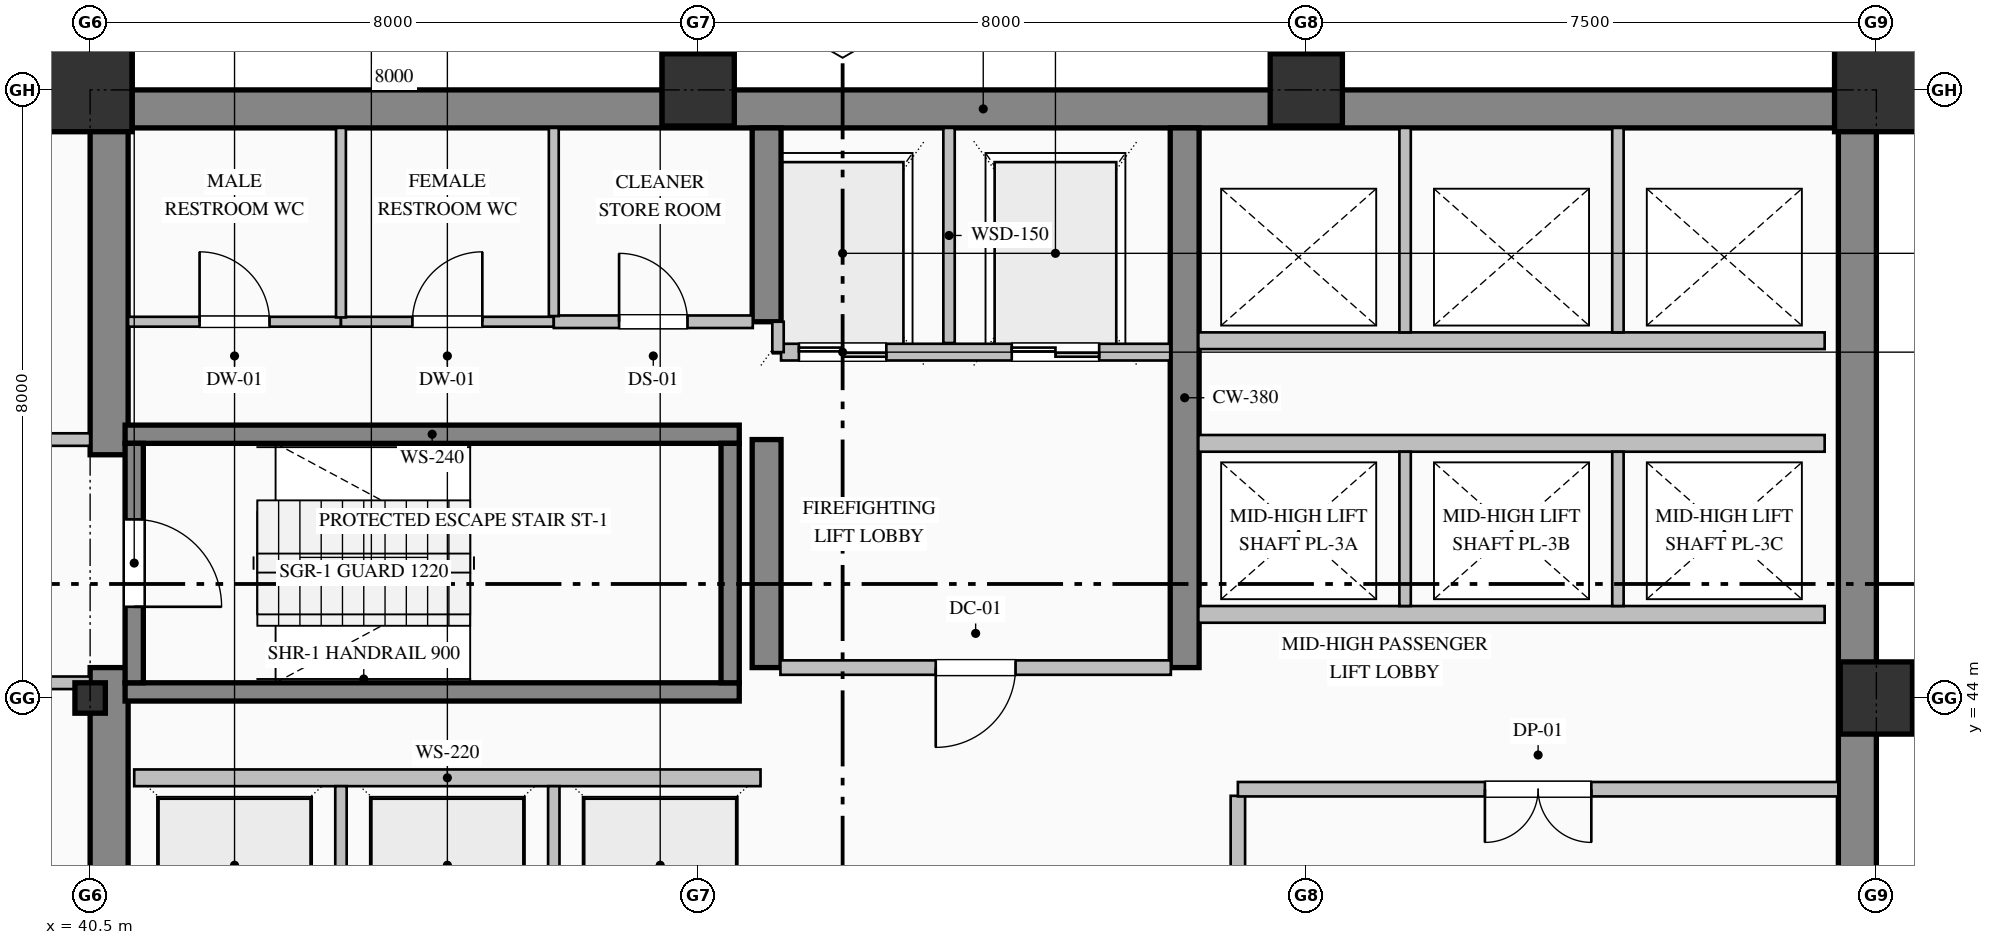
"""IFC4 building model, lengths in metres.
Left out: names, types, materials, properties, quantities, classifications, styles, units other than length and angle.
Written with IfcOpenShell. Run it as: python <this file> out.ifc"""

import sys

from ifc_helpers import new_model, si_unit, direction, frame, frame_2d, origin, origin_2d, place, context, subcontext, project, spatial, rectangle, hollow_rectangle, i_section, extrude, element, fill, save


model = new_model("IFC4")
c1 = context("Model", 3, precision=1e-05, world=origin(), true_north=direction((0.0, 1.0)))
c2 = subcontext(c1, "Body", "Model", "MODEL_VIEW")
j1 = project(units=[si_unit("LENGTHUNIT", "METRE"), si_unit("PLANEANGLEUNIT", "RADIAN")], contexts=[c1])
p1 = place(None, origin())
s1 = spatial("IfcSite", under=j1, at=p1, CompositionType="ELEMENT")
p2 = place(p1, origin())
s2 = spatial("IfcBuilding", under=s1, at=p2, CompositionType="ELEMENT")
p3 = place(p2, frame((0.0, 0.0, 171.0)))
s3 = spatial("IfcBuildingStorey", under=s2, at=p3, CompositionType="ELEMENT", Elevation=171.0)
p4 = place(p3, frame((40.5, 51.75, 0.0), z_axis=(0.0, 0.0, 1.0), x_axis=(1.0, 0.0, 0.0)))
e1 = element("IfcWall", 1, at=p4, inside=s3, PredefinedType="SHEAR", context=c2, shape_type="SweptSolid", body=[
    extrude(rectangle(XDim=23.5, YDim=0.5, at=frame_2d((11.75, 0.0))), origin(), (0.0, 0.0, 1.0), 3.765),
])
p5 = place(p3, frame((63.75, 36.32, 0.0), z_axis=(0.0, 0.0, 1.0), x_axis=(0.0, 1.0, 0.0)))
e2 = element("IfcWall", 2, at=p5, inside=s3, PredefinedType="SHEAR", context=c2, shape_type="SweptSolid", body=[
    extrude(rectangle(XDim=15.18, YDim=0.5, at=frame_2d((7.59, 0.0))), origin(), (0.0, 0.0, 1.0), 3.765),
])
p6 = place(p3, frame((40.75, 36.5, 0.0), z_axis=(0.0, 0.0, 1.0), x_axis=(0.0, 1.0, 0.0)))
e3 = element("IfcWall", 3, at=p6, inside=s3, PredefinedType="SHEAR", context=c2, shape_type="SweptSolid", body=[
    extrude(rectangle(XDim=7.9, YDim=0.5, at=frame_2d((3.95, 0.0))), origin(), (0.0, 0.0, 1.0), 3.765),
])
p7 = place(p3, frame((40.75, 47.2, 0.0), z_axis=(0.0, 0.0, 1.0), x_axis=(0.0, 1.0, 0.0)))
e4 = element("IfcWall", 4, at=p7, inside=s3, PredefinedType="SHEAR", context=c2, shape_type="SweptSolid", body=[
    extrude(rectangle(XDim=4.3, YDim=0.5, at=frame_2d((2.15, 0.0))), origin(), (0.0, 0.0, 1.0), 3.765),
])
p8 = place(p3, frame((49.4, 44.4, 0.0), z_axis=(0.0, 0.0, 1.0), x_axis=(0.0, 1.0, 0.0)))
e5 = element("IfcWall", 5, at=p8, inside=s3, PredefinedType="SHEAR", context=c2, shape_type="SweptSolid", body=[
    extrude(rectangle(XDim=3.0, YDim=0.38, at=frame_2d((1.5, 0.0))), origin(), (0.0, 0.0, 1.0), 3.765),
])
p9 = place(p3, frame((49.4, 48.95, 0.0), z_axis=(0.0, 0.0, 1.0), x_axis=(0.0, 1.0, 0.0)))
e6 = element("IfcWall", 6, at=p9, inside=s3, PredefinedType="SHEAR", context=c2, shape_type="SweptSolid", body=[
    extrude(rectangle(XDim=2.55, YDim=0.38, at=frame_2d((1.275, 0.0))), origin(), (0.0, 0.0, 1.0), 3.765),
])
p10 = place(p3, frame((54.9, 44.4, 0.0), z_axis=(0.0, 0.0, 1.0), x_axis=(0.0, 1.0, 0.0)))
e7 = element("IfcWall", 7, at=p10, inside=s3, PredefinedType="SHEAR", context=c2, shape_type="SweptSolid", body=[
    extrude(rectangle(XDim=7.1, YDim=0.38, at=frame_2d((3.55, 0.0))), origin(), (0.0, 0.0, 1.0), 3.765),
])
p11 = place(p3, frame((40.5, 44.0, 0.0), z_axis=(0.0, 0.0, 1.0), x_axis=(1.0, 0.0, 0.0)))
e8 = element("IfcColumn", 8, at=p11, inside=s3, PredefinedType="COLUMN", context=c2, shape_type="SweptSolid", body=[
    extrude(i_section(OverallWidth=0.4, OverallDepth=0.4, WebThickness=0.013, FlangeThickness=0.021, FilletRadius=0.022, at=origin_2d()), origin(), (0.0, 0.0, 1.0), 4.0),
])
p12 = place(p3, frame((40.5, 52.0, 0.0), z_axis=(0.0, 0.0, 1.0), x_axis=(1.0, 0.0, 0.0)))
e9 = element("IfcColumn", 9, at=p12, inside=s3, PredefinedType="COLUMN", context=c2, shape_type="SweptSolid", body=[
    extrude(hollow_rectangle(XDim=1.1, YDim=1.1, WallThickness=0.04, at=origin_2d()), origin(), (0.0, 0.0, 1.0), 4.0),
])
for number, where, z_axis, x_axis in (
    (10, (48.5, 52.0, 0.0), (0.0, 0.0, 1.0), (1.0, 0.0, 0.0)),
    (11, (56.5, 52.0, 0.0), (0.0, 0.0, 1.0), (1.0, 0.0, 0.0)),
    (12, (64.0, 44.0, 0.0), (0.0, 0.0, 1.0), (1.0, 0.0, 0.0)),
):
    element("IfcColumn", number, at=place(p3, frame(where, z_axis=z_axis, x_axis=x_axis)), inside=s3, PredefinedType="COLUMN", context=c2, shape_type="SweptSolid", body=[
        extrude(hollow_rectangle(XDim=0.95, YDim=0.95, WallThickness=0.036, at=origin_2d()), origin(), (0.0, 0.0, 1.0), 4.0),
    ])
p13 = place(p3, frame((64.0, 52.0, 0.0), z_axis=(0.0, 0.0, 1.0), x_axis=(1.0, 0.0, 0.0)))
e13 = element("IfcColumn", 13, at=p13, inside=s3, PredefinedType="COLUMN", context=c2, shape_type="SweptSolid", body=[
    extrude(hollow_rectangle(XDim=1.1, YDim=1.1, WallThickness=0.04, at=origin_2d()), origin(), (0.0, 0.0, 1.0), 4.0),
])
p14 = place(p3, frame((13.0, 51.82, 0.0), z_axis=(0.0, 0.0, 1.0), x_axis=(1.0, 0.0, 0.0)))
e14 = element("IfcWall", 14, at=p14, inside=s3, PredefinedType="SOLIDWALL", context=c2, shape_type="SweptSolid", body=[
    extrude(rectangle(XDim=27.52, YDim=0.36, at=frame_2d((13.76, 0.0))), origin(), (0.0, 0.0, 1.0), 3.265),
])
for number, where, z_axis, x_axis in (
    (15, (40.96, 47.47, 0.0), (0.0, 0.0, 1.0), (1.0, 0.0, 0.0)),
    (16, (49.04, 44.08, 0.0), (0.0, 0.0, 1.0), (-1.0, 0.0, 0.0)),
):
    element("IfcWall", number, at=place(p3, frame(where, z_axis=z_axis, x_axis=x_axis)), inside=s3, PredefinedType="SOLIDWALL", context=c2, shape_type="SweptSolid", body=[
        extrude(rectangle(XDim=8.08, YDim=0.24, at=frame_2d((4.04, 0.0))), origin(), (0.0, 0.0, 1.0), 4.0),
    ])
p15 = place(p3, frame((41.08, 47.35, 0.0), z_axis=(0.0, 0.0, 1.0), x_axis=(0.0, -1.0, 0.0)))
e17 = element("IfcWall", 17, at=p15, inside=s3, PredefinedType="SOLIDWALL", context=c2, shape_type="SweptSolid", body=[
    extrude(rectangle(XDim=3.15, YDim=0.24, at=frame_2d((1.575, 0.0))), origin(), (0.0, 0.0, 1.0), 4.0),
])
p16 = place(p15, frame((1.0, 0.0, 0.0)))
e18 = element("IfcOpeningElement", 18, at=p16, cuts=e17, PredefinedType="OPENING", context=c2, shape_type="SweptSolid", body=[
    extrude(rectangle(XDim=1.15, YDim=2.2, at=frame_2d((0.575, 1.1))), frame((0.0, 0.13, 0.0), z_axis=(0.0, -1.0, 0.0), x_axis=(1.0, 0.0, 0.0)), (0.0, 0.0, 1.0), 0.26),
])
p17 = place(p3, frame((48.92, 44.2, 0.0), z_axis=(0.0, 0.0, 1.0), x_axis=(0.0, 1.0, 0.0)))
e19 = element("IfcWall", 19, at=p17, inside=s3, PredefinedType="SOLIDWALL", context=c2, shape_type="SweptSolid", body=[
    extrude(rectangle(XDim=3.15, YDim=0.24, at=frame_2d((1.575, 0.0))), origin(), (0.0, 0.0, 1.0), 4.0),
])
p18 = place(p3, frame((54.71, 48.55, 0.0), z_axis=(0.0, 0.0, 1.0), x_axis=(-1.0, 0.0, 0.0)))
e20 = element("IfcWall", 20, at=p18, inside=s3, PredefinedType="PARTITIONING", context=c2, shape_type="SweptSolid", body=[
    extrude(rectangle(XDim=5.12, YDim=0.22, at=frame_2d((2.56, 0.0))), origin(), (0.0, 0.0, 1.0), 3.765),
])
p19 = place(p18, frame((3.735, 0.0, 0.0)))
e21 = element("IfcOpeningElement", 21, at=p19, cuts=e20, PredefinedType="OPENING", context=c2, shape_type="SweptSolid", body=[
    extrude(rectangle(XDim=1.15, YDim=2.2, at=frame_2d((0.575, 1.1))), frame((0.0, 0.12, 0.0), z_axis=(0.0, -1.0, 0.0), x_axis=(1.0, 0.0, 0.0)), (0.0, 0.0, 1.0), 0.24),
])
p20 = place(p18, frame((0.935, 0.0, 0.0)))
e22 = element("IfcOpeningElement", 22, at=p20, cuts=e20, PredefinedType="OPENING", context=c2, shape_type="SweptSolid", body=[
    extrude(rectangle(XDim=1.15, YDim=2.2, at=frame_2d((0.575, 1.1))), frame((0.0, 0.12, 0.0), z_axis=(0.0, -1.0, 0.0), x_axis=(1.0, 0.0, 0.0)), (0.0, 0.0, 1.0), 0.24),
])
p21 = place(p3, frame((51.8, 48.67, 0.0), z_axis=(0.0, 0.0, 1.0), x_axis=(0.0, 1.0, 0.0)))
e23 = element("IfcWall", 23, at=p21, inside=s3, PredefinedType="PARTITIONING", context=c2, shape_type="SweptSolid", body=[
    extrude(rectangle(XDim=2.83, YDim=0.15, at=frame_2d((1.415, 0.0))), origin(), (0.0, 0.0, 1.0), 3.765),
])
p22 = place(p3, frame((49.55, 48.55, 0.0), z_axis=(0.0, 0.0, 1.0), x_axis=(0.0, 1.0, 0.0)))
e24 = element("IfcWall", 24, at=p22, inside=s3, PredefinedType="PARTITIONING", context=c2, shape_type="SweptSolid", body=[
    extrude(rectangle(XDim=0.4, YDim=0.15, at=frame_2d((0.2, 0.0))), origin(), (0.0, 0.0, 1.0), 3.765),
])
p23 = place(p3, frame((41.08, 42.95, 0.0), z_axis=(0.0, 0.0, 1.0), x_axis=(1.0, 0.0, 0.0)))
e25 = element("IfcWall", 25, at=p23, inside=s3, PredefinedType="PARTITIONING", context=c2, shape_type="SweptSolid", body=[
    extrude(rectangle(XDim=8.24, YDim=0.22, at=frame_2d((4.12, 0.0))), origin(), (0.0, 0.0, 1.0), 3.765),
])
for number, where, z_axis, x_axis in (
    (26, (43.8, 40.76, 0.0), (0.0, 0.0, 1.0), (0.0, 1.0, 0.0)),
    (27, (46.6, 40.76, 0.0), (0.0, 0.0, 1.0), (0.0, 1.0, 0.0)),
):
    element("IfcWall", number, at=place(p3, frame(where, z_axis=z_axis, x_axis=x_axis)), inside=s3, PredefinedType="PARTITIONING", context=c2, shape_type="SweptSolid", body=[
        extrude(rectangle(XDim=2.08, YDim=0.15, at=frame_2d((1.04, 0.0))), origin(), (0.0, 0.0, 1.0), 3.765),
    ])
for number, where, z_axis, x_axis in (
    (28, (63.32, 45.1, 0.0), (0.0, 0.0, 1.0), (-1.0, 0.0, 0.0)),
    (29, (55.08, 47.35, 0.0), (0.0, 0.0, 1.0), (1.0, 0.0, 0.0)),
):
    element("IfcWall", number, at=place(p3, frame(where, z_axis=z_axis, x_axis=x_axis)), inside=s3, PredefinedType="PARTITIONING", context=c2, shape_type="SweptSolid", body=[
        extrude(rectangle(XDim=8.24, YDim=0.22, at=frame_2d((4.12, 0.0))), origin(), (0.0, 0.0, 1.0), 3.765),
    ])
for number, where, z_axis, x_axis in (
    (30, (57.8, 45.21, 0.0), (0.0, 0.0, 1.0), (0.0, 1.0, 0.0)),
    (31, (60.6, 45.21, 0.0), (0.0, 0.0, 1.0), (0.0, 1.0, 0.0)),
):
    element("IfcWall", number, at=place(p3, frame(where, z_axis=z_axis, x_axis=x_axis)), inside=s3, PredefinedType="PARTITIONING", context=c2, shape_type="SweptSolid", body=[
        extrude(rectangle(XDim=2.03, YDim=0.15, at=frame_2d((1.015, 0.0))), origin(), (0.0, 0.0, 1.0), 3.765),
    ])
p24 = place(p3, frame((63.32, 48.7, 0.0), z_axis=(0.0, 0.0, 1.0), x_axis=(-1.0, 0.0, 0.0)))
e32 = element("IfcWall", 32, at=p24, inside=s3, PredefinedType="PARTITIONING", context=c2, shape_type="SweptSolid", body=[
    extrude(rectangle(XDim=8.24, YDim=0.22, at=frame_2d((4.12, 0.0))), origin(), (0.0, 0.0, 1.0), 3.765),
])
for number, where, z_axis, x_axis in (
    (33, (57.8, 48.81, 0.0), (0.0, 0.0, 1.0), (0.0, 1.0, 0.0)),
    (34, (60.6, 48.81, 0.0), (0.0, 0.0, 1.0), (0.0, 1.0, 0.0)),
):
    element("IfcWall", number, at=place(p3, frame(where, z_axis=z_axis, x_axis=x_axis)), inside=s3, PredefinedType="PARTITIONING", context=c2, shape_type="SweptSolid", body=[
        extrude(rectangle(XDim=2.69, YDim=0.15, at=frame_2d((1.345, 0.0))), origin(), (0.0, 0.0, 1.0), 3.765),
    ])
p25 = place(p3, frame((37.8, 47.4, 0.0), z_axis=(0.0, 0.0, 1.0), x_axis=(1.0, 0.0, 0.0)))
e35 = element("IfcWall", 35, at=p25, inside=s3, PredefinedType="PARTITIONING", context=c2, shape_type="SweptSolid", body=[
    extrude(rectangle(XDim=2.7, YDim=0.165, at=frame_2d((1.35, 0.0))), origin(), (0.0, 0.0, 1.0), 3.765),
])
p26 = place(p25, frame((0.825, 0.0, 0.0)))
e36 = element("IfcOpeningElement", 36, at=p26, cuts=e35, PredefinedType="OPENING", context=c2, shape_type="SweptSolid", body=[
    extrude(rectangle(XDim=1.05, YDim=2.15, at=frame_2d((0.525, 1.075))), frame((0.0, 0.093, 0.0), z_axis=(0.0, -1.0, 0.0), x_axis=(1.0, 0.0, 0.0)), (0.0, 0.0, 1.0), 0.185),
])
p27 = place(p3, frame((40.5, 44.2, 0.0), z_axis=(0.0, 0.0, 1.0), x_axis=(-1.0, 0.0, 0.0)))
e37 = element("IfcWall", 37, at=p27, inside=s3, PredefinedType="PARTITIONING", context=c2, shape_type="SweptSolid", body=[
    extrude(rectangle(XDim=2.7, YDim=0.165, at=frame_2d((1.35, 0.0))), origin(), (0.0, 0.0, 1.0), 3.765),
])
p28 = place(p27, frame((0.825, 0.0, 0.0)))
e38 = element("IfcOpeningElement", 38, at=p28, cuts=e37, PredefinedType="OPENING", context=c2, shape_type="SweptSolid", body=[
    extrude(rectangle(XDim=1.05, YDim=2.15, at=frame_2d((0.525, 1.075))), frame((0.0, 0.093, 0.0), z_axis=(0.0, -1.0, 0.0), x_axis=(1.0, 0.0, 0.0)), (0.0, 0.0, 1.0), 0.185),
])
p29 = place(p3, frame((41.0, 48.95, 0.0), z_axis=(0.0, 0.0, 1.0), x_axis=(1.0, 0.0, 0.0)))
e39 = element("IfcWall", 39, at=p29, inside=s3, PredefinedType="PARTITIONING", context=c2, shape_type="SweptSolid", body=[
    extrude(rectangle(XDim=2.8, YDim=0.13, at=frame_2d((1.4, 0.0))), origin(), (0.0, 0.0, 1.0), 3.765),
])
p30 = place(p29, frame((0.94, 0.0, 0.0)))
e40 = element("IfcOpeningElement", 40, at=p30, cuts=e39, PredefinedType="OPENING", context=c2, shape_type="SweptSolid", body=[
    extrude(rectangle(XDim=0.92, YDim=2.15, at=frame_2d((0.46, 1.075))), frame((0.0, 0.075, 0.0), z_axis=(0.0, -1.0, 0.0), x_axis=(1.0, 0.0, 0.0)), (0.0, 0.0, 1.0), 0.15),
])
p31 = place(p3, frame((43.8, 48.95, 0.0), z_axis=(0.0, 0.0, 1.0), x_axis=(1.0, 0.0, 0.0)))
e41 = element("IfcWall", 41, at=p31, inside=s3, PredefinedType="PARTITIONING", context=c2, shape_type="SweptSolid", body=[
    extrude(rectangle(XDim=2.8, YDim=0.13, at=frame_2d((1.4, 0.0))), origin(), (0.0, 0.0, 1.0), 3.765),
])
p32 = place(p31, frame((0.94, 0.0, 0.0)))
e42 = element("IfcOpeningElement", 42, at=p32, cuts=e41, PredefinedType="OPENING", context=c2, shape_type="SweptSolid", body=[
    extrude(rectangle(XDim=0.92, YDim=2.15, at=frame_2d((0.46, 1.075))), frame((0.0, 0.075, 0.0), z_axis=(0.0, -1.0, 0.0), x_axis=(1.0, 0.0, 0.0)), (0.0, 0.0, 1.0), 0.15),
])
p33 = place(p3, frame((46.6, 48.95, 0.0), z_axis=(0.0, 0.0, 1.0), x_axis=(1.0, 0.0, 0.0)))
e43 = element("IfcWall", 43, at=p33, inside=s3, PredefinedType="PARTITIONING", context=c2, shape_type="SweptSolid", body=[
    extrude(rectangle(XDim=2.618, YDim=0.165, at=frame_2d((1.309, 0.0))), origin(), (0.0, 0.0, 1.0), 3.765),
])
p34 = place(p33, frame((0.859, 0.0, 0.0)))
e44 = element("IfcOpeningElement", 44, at=p34, cuts=e43, PredefinedType="OPENING", context=c2, shape_type="SweptSolid", body=[
    extrude(rectangle(XDim=0.9, YDim=2.15, at=frame_2d((0.45, 1.075))), frame((0.0, 0.093, 0.0), z_axis=(0.0, -1.0, 0.0), x_axis=(1.0, 0.0, 0.0)), (0.0, 0.0, 1.0), 0.185),
])
p35 = place(p3, frame((54.718, 44.4, 0.0), z_axis=(0.0, 0.0, 1.0), x_axis=(-1.0, 0.0, 0.0)))
e45 = element("IfcWall", 45, at=p35, inside=s3, PredefinedType="PARTITIONING", context=c2, shape_type="SweptSolid", body=[
    extrude(rectangle(XDim=5.136, YDim=0.19, at=frame_2d((2.568, 0.0))), origin(), (0.0, 0.0, 1.0), 3.765),
])
p36 = place(p35, frame((2.043, 0.0, 0.0)))
e46 = element("IfcOpeningElement", 46, at=p36, cuts=e45, PredefinedType="OPENING", context=c2, shape_type="SweptSolid", body=[
    extrude(rectangle(XDim=1.05, YDim=2.15, at=frame_2d((0.525, 1.075))), frame((0.0, 0.105, 0.0), z_axis=(0.0, -1.0, 0.0), x_axis=(1.0, 0.0, 0.0)), (0.0, 0.0, 1.0), 0.21),
])
p37 = place(p3, frame((55.6, 42.713, 0.0), z_axis=(0.0, 0.0, 1.0), x_axis=(0.0, -1.0, 0.0)))
e47 = element("IfcWall", 47, at=p37, inside=s3, PredefinedType="PARTITIONING", context=c2, shape_type="SweptSolid", body=[
    extrude(rectangle(XDim=2.731, YDim=0.19, at=frame_2d((1.365, 0.0))), origin(), (0.0, 0.0, 1.0), 3.765),
])
p38 = place(p3, frame((63.5, 42.8, 0.0), z_axis=(0.0, 0.0, 1.0), x_axis=(-1.0, 0.0, 0.0)))
e48 = element("IfcWall", 48, at=p38, inside=s3, PredefinedType="PARTITIONING", context=c2, shape_type="SweptSolid", body=[
    extrude(rectangle(XDim=7.9, YDim=0.19, at=frame_2d((3.95, 0.0))), origin(), (0.0, 0.0, 1.0), 3.765),
])
p39 = place(p38, frame((3.25, 0.0, 0.0)))
e49 = element("IfcOpeningElement", 49, at=p39, cuts=e48, PredefinedType="OPENING", context=c2, shape_type="SweptSolid", body=[
    extrude(rectangle(XDim=1.4, YDim=2.25, at=frame_2d((0.7, 1.125))), frame((0.0, 0.105, 0.0), z_axis=(0.0, -1.0, 0.0), x_axis=(1.0, 0.0, 0.0)), (0.0, 0.0, 1.0), 0.21),
])
p40 = place(p3, frame((43.8, 51.5, 0.0), z_axis=(0.0, 0.0, 1.0), x_axis=(0.0, -1.0, 0.0)))
e50 = element("IfcWall", 50, at=p40, inside=s3, PredefinedType="PARTITIONING", context=c2, shape_type="SweptSolid", body=[
    extrude(rectangle(XDim=2.493, YDim=0.13, at=frame_2d((1.247, 0.0))), origin(), (0.0, 0.0, 1.0), 3.765),
])
p41 = place(p3, frame((46.6, 51.5, 0.0), z_axis=(0.0, 0.0, 1.0), x_axis=(0.0, -1.0, 0.0)))
e51 = element("IfcWall", 51, at=p41, inside=s3, PredefinedType="PARTITIONING", context=c2, shape_type="SweptSolid", body=[
    extrude(rectangle(XDim=2.476, YDim=0.13, at=frame_2d((1.238, 0.0))), origin(), (0.0, 0.0, 1.0), 3.765),
])
p42 = place(p16, origin())
e52 = element("IfcDoor", 52, at=p42, inside=s3, OperationType="SINGLE_SWING_RIGHT", PredefinedType="DOOR", context=c2, shape_type="SweptSolid", body=[
    extrude(rectangle(XDim=1.15, YDim=2.2, at=frame_2d((0.575, 1.1))), frame((0.0, 0.025, 0.0), z_axis=(0.0, -1.0, 0.0), x_axis=(1.0, 0.0, 0.0)), (0.0, 0.0, 1.0), 0.05),
])
fill(e18, e52)
p43 = place(p19, origin())
e53 = element("IfcDoor", 53, at=p43, inside=s3, OperationType="DOUBLE_DOOR_SLIDING", PredefinedType="DOOR", context=c2, shape_type="SweptSolid", body=[
    extrude(rectangle(XDim=1.15, YDim=2.2, at=frame_2d((0.575, 1.1))), frame((0.0, 0.025, 0.0), z_axis=(0.0, -1.0, 0.0), x_axis=(1.0, 0.0, 0.0)), (0.0, 0.0, 1.0), 0.05),
])
fill(e21, e53)
p44 = place(p20, origin())
e54 = element("IfcDoor", 54, at=p44, inside=s3, OperationType="DOUBLE_DOOR_SLIDING", PredefinedType="DOOR", context=c2, shape_type="SweptSolid", body=[
    extrude(rectangle(XDim=1.15, YDim=2.2, at=frame_2d((0.575, 1.1))), frame((0.0, 0.025, 0.0), z_axis=(0.0, -1.0, 0.0), x_axis=(1.0, 0.0, 0.0)), (0.0, 0.0, 1.0), 0.05),
])
fill(e22, e54)
p45 = place(p36, origin())
e55 = element("IfcDoor", 55, at=p45, inside=s3, OperationType="SINGLE_SWING_RIGHT", PredefinedType="DOOR", context=c2, shape_type="SweptSolid", body=[
    extrude(rectangle(XDim=1.05, YDim=2.15, at=frame_2d((0.525, 1.075))), frame((0.0, 0.025, 0.0), z_axis=(0.0, -1.0, 0.0), x_axis=(1.0, 0.0, 0.0)), (0.0, 0.0, 1.0), 0.05),
])
fill(e46, e55)
p46 = place(p30, origin())
e56 = element("IfcDoor", 56, at=p46, inside=s3, OperationType="SINGLE_SWING_LEFT", PredefinedType="DOOR", context=c2, shape_type="SweptSolid", body=[
    extrude(rectangle(XDim=0.92, YDim=2.15, at=frame_2d((0.46, 1.075))), frame((0.0, 0.025, 0.0), z_axis=(0.0, -1.0, 0.0), x_axis=(1.0, 0.0, 0.0)), (0.0, 0.0, 1.0), 0.05),
])
fill(e40, e56)
p47 = place(p32, origin())
e57 = element("IfcDoor", 57, at=p47, inside=s3, OperationType="SINGLE_SWING_RIGHT", PredefinedType="DOOR", context=c2, shape_type="SweptSolid", body=[
    extrude(rectangle(XDim=0.92, YDim=2.15, at=frame_2d((0.46, 1.075))), frame((0.0, 0.025, 0.0), z_axis=(0.0, -1.0, 0.0), x_axis=(1.0, 0.0, 0.0)), (0.0, 0.0, 1.0), 0.05),
])
fill(e42, e57)
p48 = place(p34, origin())
e58 = element("IfcDoor", 58, at=p48, inside=s3, OperationType="SINGLE_SWING_LEFT", PredefinedType="DOOR", context=c2, shape_type="SweptSolid", body=[
    extrude(rectangle(XDim=0.9, YDim=2.15, at=frame_2d((0.45, 1.075))), frame((0.0, 0.025, 0.0), z_axis=(0.0, -1.0, 0.0), x_axis=(1.0, 0.0, 0.0)), (0.0, 0.0, 1.0), 0.05),
])
fill(e44, e58)
p49 = place(p39, origin())
e59 = element("IfcDoor", 59, at=p49, inside=s3, OperationType="DOUBLE_DOOR_SINGLE_SWING", PredefinedType="DOOR", context=c2, shape_type="SweptSolid", body=[
    extrude(rectangle(XDim=1.4, YDim=2.25, at=frame_2d((0.7, 1.125))), frame((0.0, 0.025, 0.0), z_axis=(0.0, -1.0, 0.0), x_axis=(1.0, 0.0, 0.0)), (0.0, 0.0, 1.0), 0.05),
])
fill(e49, e59)
save(model, sys.argv[1])
